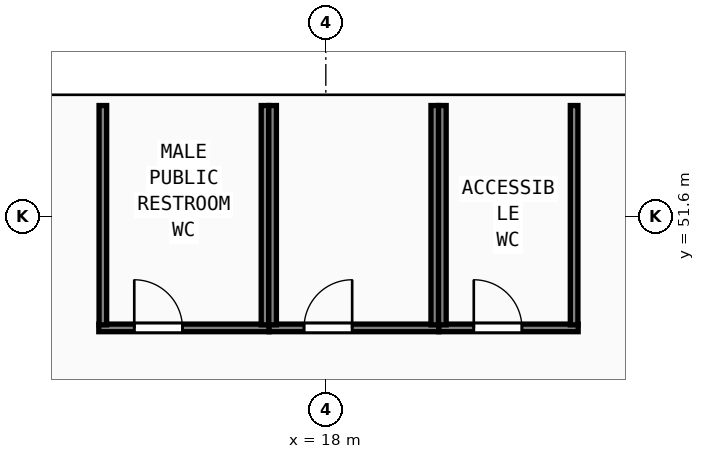
"""IFC4 building model, lengths in metres.
Left out: names, types, materials, properties, quantities, classifications, styles, units other than length and angle.
Written with IfcOpenShell. Run it as: python <this file> out.ifc"""

import sys

from ifc_helpers import new_model, si_unit, direction, frame, frame_2d, origin, origin_2d, place, context, subcontext, project, spatial, rectangle, extrude, element, fill, save


model = new_model("IFC4")
c1 = context("Model", 3, precision=1e-05, world=origin(), true_north=direction((0.0, 1.0)))
c2 = subcontext(c1, "Body", "Model", "MODEL_VIEW")
j1 = project(units=[si_unit("LENGTHUNIT", "METRE"), si_unit("PLANEANGLEUNIT", "RADIAN")], contexts=[c1])
p1 = place(None, origin())
s1 = spatial("IfcSite", under=j1, at=p1, CompositionType="ELEMENT")
p2 = place(p1, origin())
s2 = spatial("IfcBuilding", under=s1, at=p2, CompositionType="ELEMENT")
p3 = place(p2, frame((0.0, 0.0, 19.8)))
s3 = spatial("IfcBuildingStorey", under=s2, at=p3, CompositionType="ELEMENT", Elevation=19.8)
p4 = place(p3, frame((18.0, 51.6, 0.0), z_axis=(0.0, 0.0, 1.0), x_axis=(1.0, 0.0, 0.0)))
e1 = element("IfcColumn", 1, at=p4, inside=s3, PredefinedType="COLUMN", context=c2, shape_type="SweptSolid", body=[
    extrude(rectangle(XDim=0.9, YDim=0.9, at=origin_2d()), origin(), (0.0, 0.0, 1.0), 4.2),
])
p5 = place(p3, frame((13.52, 49.4, 0.0), z_axis=(0.0, 0.0, 1.0), x_axis=(1.0, 0.0, 0.0)))
e2 = element("IfcWall", 2, at=p5, inside=s3, PredefinedType="PARTITIONING", context=c2, shape_type="SweptSolid", body=[
    extrude(rectangle(XDim=3.36, YDim=0.15, at=frame_2d((1.68, 0.0))), origin(), (0.0, 0.0, 1.0), 4.0),
])
p6 = place(p5, frame((0.7, 0.0, 0.0)))
e3 = element("IfcOpeningElement", 3, at=p6, cuts=e2, PredefinedType="OPENING", context=c2, shape_type="SweptSolid", body=[
    extrude(rectangle(XDim=0.95, YDim=2.12, at=frame_2d((0.475, 1.06))), frame((0.0, 0.085, 0.0), z_axis=(0.0, -1.0, 0.0), x_axis=(1.0, 0.0, 0.0)), (0.0, 0.0, 1.0), 0.17),
])
for number, where, z_axis, x_axis in (
    (4, (13.6, 49.46, 0.0), (0.0, 0.0, 1.0), (0.0, 1.0, 0.0)),
    (5, (16.8, 49.46, 0.0), (0.0, 0.0, 1.0), (0.0, 1.0, 0.0)),
):
    element("IfcWall", number, at=place(p3, frame(where, z_axis=z_axis, x_axis=x_axis)), inside=s3, PredefinedType="PARTITIONING", context=c2, shape_type="SweptSolid", body=[
        extrude(rectangle(XDim=4.328, YDim=0.15, at=frame_2d((2.164, 0.0))), origin(), (0.0, 0.0, 1.0), 4.0),
    ])
p7 = place(p3, frame((16.882, 49.4, 0.0), z_axis=(0.0, 0.0, 1.0), x_axis=(1.0, 0.0, 0.0)))
e6 = element("IfcWall", 6, at=p7, inside=s3, PredefinedType="PARTITIONING", context=c2, shape_type="SweptSolid", body=[
    extrude(rectangle(XDim=3.348, YDim=0.15, at=frame_2d((1.674, 0.0))), origin(), (0.0, 0.0, 1.0), 4.0),
])
p8 = place(p7, frame((0.688, 0.0, 0.0)))
e7 = element("IfcOpeningElement", 7, at=p8, cuts=e6, PredefinedType="OPENING", context=c2, shape_type="SweptSolid", body=[
    extrude(rectangle(XDim=0.95, YDim=2.12, at=frame_2d((0.475, 1.06))), frame((0.0, 0.085, 0.0), z_axis=(0.0, -1.0, 0.0), x_axis=(1.0, 0.0, 0.0)), (0.0, 0.0, 1.0), 0.17),
])
for number, where, z_axis, x_axis in (
    (8, (16.95, 49.46, 0.0), (0.0, 0.0, 1.0), (0.0, 1.0, 0.0)),
    (9, (20.15, 49.46, 0.0), (0.0, 0.0, 1.0), (0.0, 1.0, 0.0)),
):
    element("IfcWall", number, at=place(p3, frame(where, z_axis=z_axis, x_axis=x_axis)), inside=s3, PredefinedType="PARTITIONING", context=c2, shape_type="SweptSolid", body=[
        extrude(rectangle(XDim=4.328, YDim=0.15, at=frame_2d((2.164, 0.0))), origin(), (0.0, 0.0, 1.0), 4.0),
    ])
p9 = place(p3, frame((20.232, 49.4, 0.0), z_axis=(0.0, 0.0, 1.0), x_axis=(1.0, 0.0, 0.0)))
e10 = element("IfcWall", 10, at=p9, inside=s3, PredefinedType="PARTITIONING", context=c2, shape_type="SweptSolid", body=[
    extrude(rectangle(XDim=2.748, YDim=0.15, at=frame_2d((1.374, 0.0))), origin(), (0.0, 0.0, 1.0), 4.0),
])
p10 = place(p9, frame((0.688, 0.0, 0.0)))
e11 = element("IfcOpeningElement", 11, at=p10, cuts=e10, PredefinedType="OPENING", context=c2, shape_type="SweptSolid", body=[
    extrude(rectangle(XDim=0.95, YDim=2.12, at=frame_2d((0.475, 1.06))), frame((0.0, 0.085, 0.0), z_axis=(0.0, -1.0, 0.0), x_axis=(1.0, 0.0, 0.0)), (0.0, 0.0, 1.0), 0.17),
])
for number, where, z_axis, x_axis in (
    (12, (20.3, 49.46, 0.0), (0.0, 0.0, 1.0), (0.0, 1.0, 0.0)),
    (13, (22.9, 49.46, 0.0), (0.0, 0.0, 1.0), (0.0, 1.0, 0.0)),
):
    element("IfcWall", number, at=place(p3, frame(where, z_axis=z_axis, x_axis=x_axis)), inside=s3, PredefinedType="PARTITIONING", context=c2, shape_type="SweptSolid", body=[
        extrude(rectangle(XDim=4.328, YDim=0.15, at=frame_2d((2.164, 0.0))), origin(), (0.0, 0.0, 1.0), 4.0),
    ])
p11 = place(p6, origin())
e14 = element("IfcDoor", 14, at=p11, inside=s3, OperationType="SINGLE_SWING_LEFT", PredefinedType="DOOR", context=c2, shape_type="SweptSolid", body=[
    extrude(rectangle(XDim=0.95, YDim=2.12, at=frame_2d((0.475, 1.06))), frame((0.0, 0.025, 0.0), z_axis=(0.0, -1.0, 0.0), x_axis=(1.0, 0.0, 0.0)), (0.0, 0.0, 1.0), 0.05),
])
fill(e3, e14)
p12 = place(p8, origin())
e15 = element("IfcDoor", 15, at=p12, inside=s3, OperationType="SINGLE_SWING_RIGHT", PredefinedType="DOOR", context=c2, shape_type="SweptSolid", body=[
    extrude(rectangle(XDim=0.95, YDim=2.12, at=frame_2d((0.475, 1.06))), frame((0.0, 0.025, 0.0), z_axis=(0.0, -1.0, 0.0), x_axis=(1.0, 0.0, 0.0)), (0.0, 0.0, 1.0), 0.05),
])
fill(e7, e15)
p13 = place(p10, origin())
e16 = element("IfcDoor", 16, at=p13, inside=s3, OperationType="SINGLE_SWING_LEFT", PredefinedType="DOOR", context=c2, shape_type="SweptSolid", body=[
    extrude(rectangle(XDim=0.95, YDim=2.12, at=frame_2d((0.475, 1.06))), frame((0.0, 0.025, 0.0), z_axis=(0.0, -1.0, 0.0), x_axis=(1.0, 0.0, 0.0)), (0.0, 0.0, 1.0), 0.05),
])
fill(e11, e16)
save(model, sys.argv[1])
